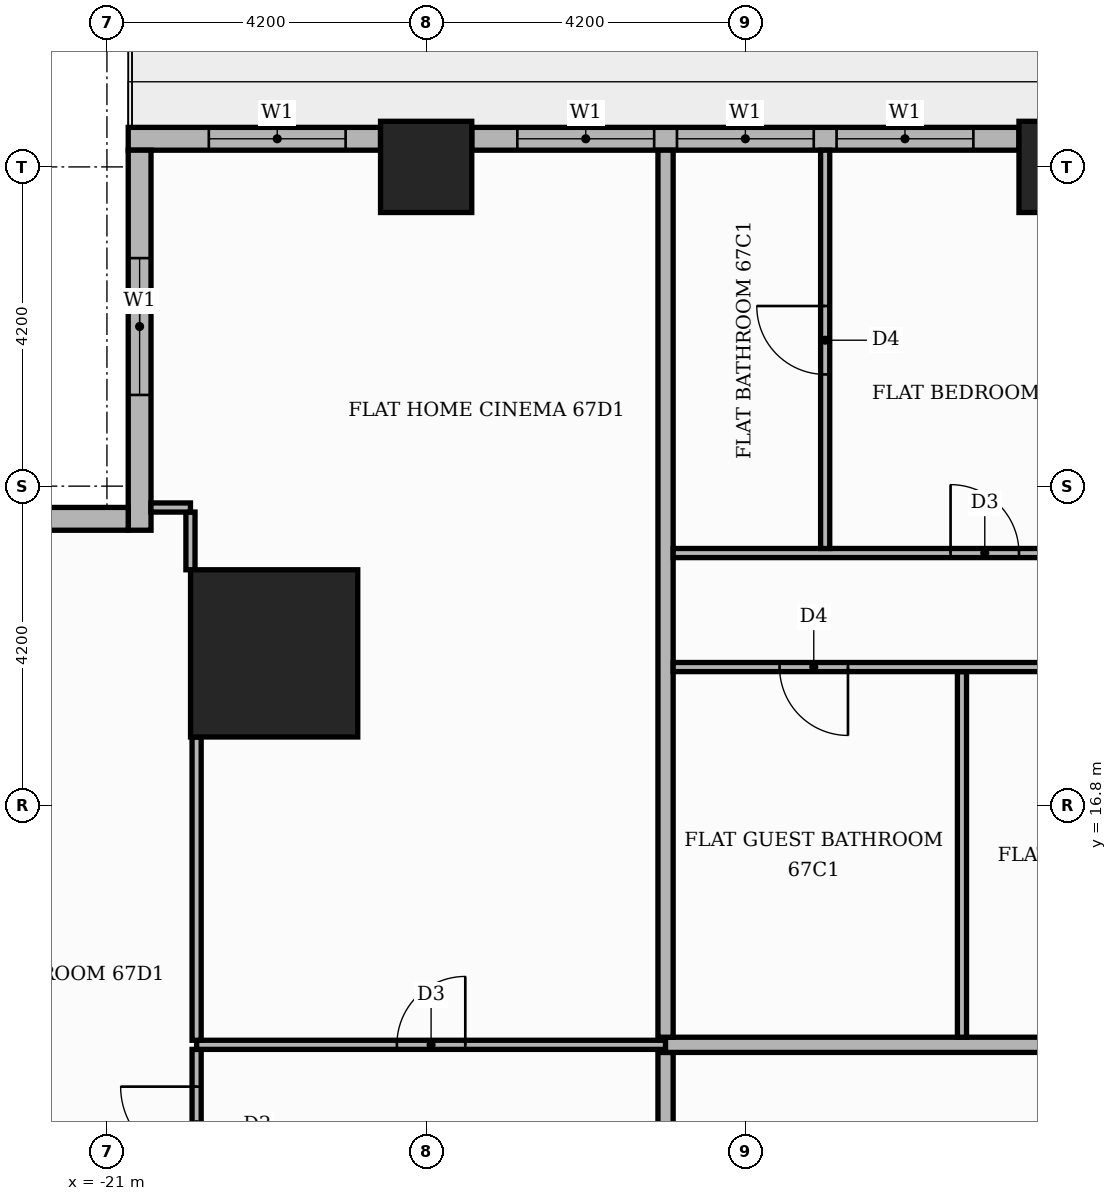
"""IFC4 building model, lengths in metres.
Left out: names, types, materials, properties, quantities, classifications, styles, units other than length and angle.
Written with IfcOpenShell. Run it as: python <this file> out.ifc"""

import sys

from ifc_helpers import new_model, si_unit, direction, frame, frame_2d, origin, origin_2d, place, context, subcontext, project, spatial, rectangle, extrude, element, fill, save


model = new_model("IFC4")
c1 = context("Model", 3, precision=1e-05, world=origin(), true_north=direction((0.0, 1.0)))
c2 = subcontext(c1, "Body", "Model", "MODEL_VIEW")
j1 = project(units=[si_unit("LENGTHUNIT", "METRE"), si_unit("PLANEANGLEUNIT", "RADIAN")], contexts=[c1])
p1 = place(None, origin())
s1 = spatial("IfcSite", under=j1, at=p1, CompositionType="ELEMENT")
p2 = place(p1, origin())
s2 = spatial("IfcBuilding", under=s1, at=p2, CompositionType="ELEMENT")
p3 = place(p2, frame((0.0, 0.0, 279.6)))
s3 = spatial("IfcBuildingStorey", under=s2, at=p3, CompositionType="ELEMENT", Elevation=279.6)
p4 = place(p3, frame((-18.8, 18.8, 0.0), z_axis=(0.0, 0.0, 1.0), x_axis=(1.0, 0.0, 0.0)))
e1 = element("IfcColumn", 1, at=p4, inside=s3, PredefinedType="COLUMN", context=c2, shape_type="SweptSolid", body=[
    extrude(rectangle(XDim=2.2, YDim=2.2, at=origin_2d()), origin(), (0.0, 0.0, 1.0), 3.9),
])
for number, where, z_axis, x_axis in (
    (2, (-8.4, 25.2, 0.0), (0.0, 0.0, 1.0), (1.0, 0.0, 0.0)),
    (3, (-16.8, 25.2, 0.0), (0.0, 0.0, 1.0), (1.0, 0.0, 0.0)),
):
    element("IfcColumn", number, at=place(p3, frame(where, z_axis=z_axis, x_axis=x_axis)), inside=s3, PredefinedType="COLUMN", context=c2, shape_type="SweptSolid", body=[
        extrude(rectangle(XDim=1.2, YDim=1.2, at=origin_2d()), origin(), (0.0, 0.0, 1.0), 3.9),
    ])
p5 = place(p3, frame((-9.0, 25.57, 0.0), z_axis=(0.0, 0.0, 1.0), x_axis=(-1.0, 0.0, 0.0)))
e4 = element("IfcWall", 4, at=p5, inside=s3, PredefinedType="STANDARD", context=c2, shape_type="SweptSolid", body=[
    extrude(rectangle(XDim=7.2, YDim=0.3, at=frame_2d((3.6, 0.0))), origin(), (0.0, 0.0, 1.0), 3.48),
])
p6 = place(p5, frame((0.6, 0.0, 0.9)))
e5 = element("IfcOpeningElement", 5, at=p6, cuts=e4, PredefinedType="OPENING", context=c2, shape_type="SweptSolid", body=[
    extrude(rectangle(XDim=1.8, YDim=2.1, at=frame_2d((0.9, 1.05))), frame((0.0, 0.16, 0.0), z_axis=(0.0, -1.0, 0.0), x_axis=(1.0, 0.0, 0.0)), (0.0, 0.0, 1.0), 0.32),
])
p7 = place(p5, frame((2.7, 0.0, 0.9)))
e6 = element("IfcOpeningElement", 6, at=p7, cuts=e4, PredefinedType="OPENING", context=c2, shape_type="SweptSolid", body=[
    extrude(rectangle(XDim=1.8, YDim=2.1, at=frame_2d((0.9, 1.05))), frame((0.0, 0.16, 0.0), z_axis=(0.0, -1.0, 0.0), x_axis=(1.0, 0.0, 0.0)), (0.0, 0.0, 1.0), 0.32),
])
p8 = place(p5, frame((4.8, 0.0, 0.9)))
e7 = element("IfcOpeningElement", 7, at=p8, cuts=e4, PredefinedType="OPENING", context=c2, shape_type="SweptSolid", body=[
    extrude(rectangle(XDim=1.8, YDim=2.1, at=frame_2d((0.9, 1.05))), frame((0.0, 0.16, 0.0), z_axis=(0.0, -1.0, 0.0), x_axis=(1.0, 0.0, 0.0)), (0.0, 0.0, 1.0), 0.32),
])
p9 = place(p3, frame((-17.4, 25.57, 0.0), z_axis=(0.0, 0.0, 1.0), x_axis=(-1.0, 0.0, 0.0)))
e8 = element("IfcWall", 8, at=p9, inside=s3, PredefinedType="STANDARD", context=c2, shape_type="SweptSolid", body=[
    extrude(rectangle(XDim=3.32, YDim=0.3, at=frame_2d((1.66, 0.0))), origin(), (0.0, 0.0, 1.0), 3.48),
])
p10 = place(p9, frame((0.459, 0.0, 0.9)))
e9 = element("IfcOpeningElement", 9, at=p10, cuts=e8, PredefinedType="OPENING", context=c2, shape_type="SweptSolid", body=[
    extrude(rectangle(XDim=1.8, YDim=2.1, at=frame_2d((0.9, 1.05))), frame((0.0, 0.16, 0.0), z_axis=(0.0, -1.0, 0.0), x_axis=(1.0, 0.0, 0.0)), (0.0, 0.0, 1.0), 0.32),
])
p11 = place(p3, frame((-20.57, 25.42, 0.0), z_axis=(0.0, 0.0, 1.0), x_axis=(0.0, -1.0, 0.0)))
e10 = element("IfcWall", 10, at=p11, inside=s3, PredefinedType="STANDARD", context=c2, shape_type="SweptSolid", body=[
    extrude(rectangle(XDim=5.0, YDim=0.3, at=frame_2d((2.5, 0.0))), origin(), (0.0, 0.0, 1.0), 3.48),
])
p12 = place(p11, frame((1.42, 0.0, 0.9)))
e11 = element("IfcOpeningElement", 11, at=p12, cuts=e10, PredefinedType="OPENING", context=c2, shape_type="SweptSolid", body=[
    extrude(rectangle(XDim=1.8, YDim=2.1, at=frame_2d((0.9, 1.05))), frame((0.0, 0.16, 0.0), z_axis=(0.0, -1.0, 0.0), x_axis=(1.0, 0.0, 0.0)), (0.0, 0.0, 1.0), 0.32),
])
p13 = place(p3, frame((-20.72, 20.57, 0.0), z_axis=(0.0, 0.0, 1.0), x_axis=(-1.0, 0.0, 0.0)))
e12 = element("IfcWall", 12, at=p13, inside=s3, PredefinedType="STANDARD", context=c2, shape_type="SweptSolid", body=[
    extrude(rectangle(XDim=5.0, YDim=0.3, at=frame_2d((2.5, 0.0))), origin(), (0.0, 0.0, 1.0), 3.48),
])
p14 = place(p13, frame((1.48, 0.0, 0.9)))
e13 = element("IfcOpeningElement", 13, at=p14, cuts=e12, PredefinedType="OPENING", context=c2, shape_type="SweptSolid", body=[
    extrude(rectangle(XDim=1.8, YDim=2.1, at=frame_2d((0.9, 1.05))), frame((0.0, 0.16, 0.0), z_axis=(0.0, -1.0, 0.0), x_axis=(1.0, 0.0, 0.0)), (0.0, 0.0, 1.0), 0.32),
])
p15 = place(p3, frame((-13.65, 11.1, 0.0), z_axis=(0.0, 0.0, 1.0), x_axis=(0.0, 1.0, 0.0)))
e14 = element("IfcWall", 14, at=p15, inside=s3, PredefinedType="PARTITIONING", context=c2, shape_type="SweptSolid", body=[
    extrude(rectangle(XDim=2.45, YDim=0.2, at=frame_2d((1.225, 0.0))), origin(), (0.0, 0.0, 1.0), 3.48),
])
p16 = place(p3, frame((-19.82, 11.61, 0.0), z_axis=(0.0, 0.0, 1.0), x_axis=(0.0, 1.0, 0.0)))
e15 = element("IfcWall", 15, at=p16, inside=s3, PredefinedType="PARTITIONING", context=c2, shape_type="SweptSolid", body=[
    extrude(rectangle(XDim=1.98, YDim=0.12, at=frame_2d((0.99, 0.0))), origin(), (0.0, 0.0, 1.0), 3.48),
])
p17 = place(p16, frame((0.49, 0.0, 0.0)))
e16 = element("IfcOpeningElement", 16, at=p17, cuts=e15, PredefinedType="OPENING", context=c2, shape_type="SweptSolid", body=[
    extrude(rectangle(XDim=1.0, YDim=2.1, at=frame_2d((0.5, 1.05))), frame((0.0, 0.07, 0.0), z_axis=(0.0, -1.0, 0.0), x_axis=(1.0, 0.0, 0.0)), (0.0, 0.0, 1.0), 0.14),
])
p18 = place(p3, frame((-19.82, 13.65, 0.0), z_axis=(0.0, 0.0, 1.0), x_axis=(1.0, 0.0, 0.0)))
e17 = element("IfcWall", 17, at=p18, inside=s3, PredefinedType="PARTITIONING", context=c2, shape_type="SweptSolid", body=[
    extrude(rectangle(XDim=6.17, YDim=0.12, at=frame_2d((3.085, 0.0))), origin(), (0.0, 0.0, 1.0), 3.48),
])
p19 = place(p18, frame((2.635, 0.0, 0.0)))
e18 = element("IfcOpeningElement", 18, at=p19, cuts=e17, PredefinedType="OPENING", context=c2, shape_type="SweptSolid", body=[
    extrude(rectangle(XDim=0.9, YDim=2.1, at=frame_2d((0.45, 1.05))), frame((0.0, 0.07, 0.0), z_axis=(0.0, -1.0, 0.0), x_axis=(1.0, 0.0, 0.0)), (0.0, 0.0, 1.0), 0.14),
])
p20 = place(p3, frame((-13.65, 13.65, 0.0), z_axis=(0.0, 0.0, 1.0), x_axis=(1.0, 0.0, 0.0)))
e19 = element("IfcWall", 19, at=p20, inside=s3, PredefinedType="PARTITIONING", context=c2, shape_type="SweptSolid", body=[
    extrude(rectangle(XDim=39.07, YDim=0.2, at=frame_2d((19.535, 0.0))), origin(), (0.0, 0.0, 1.0), 3.48),
])
p21 = place(p20, frame((23.6, 0.0, 0.0)))
e20 = element("IfcOpeningElement", 20, at=p21, cuts=e19, PredefinedType="OPENING", context=c2, shape_type="SweptSolid", body=[
    extrude(rectangle(XDim=1.1, YDim=2.4, at=frame_2d((0.55, 1.2))), frame((0.0, 0.11, 0.0), z_axis=(0.0, -1.0, 0.0), x_axis=(1.0, 0.0, 0.0)), (0.0, 0.0, 1.0), 0.22),
])
p22 = place(p3, frame((-19.82, 13.71, 0.0), z_axis=(0.0, 0.0, 1.0), x_axis=(0.0, 1.0, 0.0)))
e21 = element("IfcWall", 21, at=p22, inside=s3, PredefinedType="PARTITIONING", context=c2, shape_type="SweptSolid", body=[
    extrude(rectangle(XDim=3.99, YDim=0.12, at=frame_2d((1.995, 0.0))), origin(), (0.0, 0.0, 1.0), 3.48),
])
p23 = place(p3, frame((-13.65, 13.75, 0.0), z_axis=(0.0, 0.0, 1.0), x_axis=(0.0, 1.0, 0.0)))
e22 = element("IfcWall", 22, at=p23, inside=s3, PredefinedType="PARTITIONING", context=c2, shape_type="SweptSolid", body=[
    extrude(rectangle(XDim=11.67, YDim=0.2, at=frame_2d((5.835, 0.0))), origin(), (0.0, 0.0, 1.0), 3.48),
])
p24 = place(p3, frame((-9.75, 13.75, 0.0), z_axis=(0.0, 0.0, 1.0), x_axis=(0.0, 1.0, 0.0)))
e23 = element("IfcWall", 23, at=p24, inside=s3, PredefinedType="PARTITIONING", context=c2, shape_type="SweptSolid", body=[
    extrude(rectangle(XDim=4.81, YDim=0.12, at=frame_2d((2.405, 0.0))), origin(), (0.0, 0.0, 1.0), 3.48),
])
p25 = place(p3, frame((-13.55, 18.62, 0.0), z_axis=(0.0, 0.0, 1.0), x_axis=(1.0, 0.0, 0.0)))
e24 = element("IfcWall", 24, at=p25, inside=s3, PredefinedType="PARTITIONING", context=c2, shape_type="SweptSolid", body=[
    extrude(rectangle(XDim=20.9, YDim=0.12, at=frame_2d((10.45, 0.0))), origin(), (0.0, 0.0, 1.0), 3.48),
])
p26 = place(p25, frame((16.925, 0.0, 0.0)))
e25 = element("IfcOpeningElement", 25, at=p26, cuts=e24, PredefinedType="OPENING", context=c2, shape_type="SweptSolid", body=[
    extrude(rectangle(XDim=0.9, YDim=2.1, at=frame_2d((0.45, 1.05))), frame((0.0, 0.07, 0.0), z_axis=(0.0, -1.0, 0.0), x_axis=(1.0, 0.0, 0.0)), (0.0, 0.0, 1.0), 0.14),
])
p27 = place(p25, frame((11.675, 0.0, 0.0)))
e26 = element("IfcOpeningElement", 26, at=p27, cuts=e24, PredefinedType="OPENING", context=c2, shape_type="SweptSolid", body=[
    extrude(rectangle(XDim=0.9, YDim=2.1, at=frame_2d((0.45, 1.05))), frame((0.0, 0.07, 0.0), z_axis=(0.0, -1.0, 0.0), x_axis=(1.0, 0.0, 0.0)), (0.0, 0.0, 1.0), 0.14),
])
p28 = place(p25, frame((8.9, 0.0, 0.0)))
e27 = element("IfcOpeningElement", 27, at=p28, cuts=e24, PredefinedType="OPENING", context=c2, shape_type="SweptSolid", body=[
    extrude(rectangle(XDim=0.9, YDim=2.1, at=frame_2d((0.45, 1.05))), frame((0.0, 0.07, 0.0), z_axis=(0.0, -1.0, 0.0), x_axis=(1.0, 0.0, 0.0)), (0.0, 0.0, 1.0), 0.14),
])
p29 = place(p25, frame((5.6, 0.0, 0.0)))
e28 = element("IfcOpeningElement", 28, at=p29, cuts=e24, PredefinedType="OPENING", context=c2, shape_type="SweptSolid", body=[
    extrude(rectangle(XDim=0.9, YDim=2.1, at=frame_2d((0.45, 1.05))), frame((0.0, 0.07, 0.0), z_axis=(0.0, -1.0, 0.0), x_axis=(1.0, 0.0, 0.0)), (0.0, 0.0, 1.0), 0.14),
])
p30 = place(p25, frame((1.4, 0.0, 0.0)))
e29 = element("IfcOpeningElement", 29, at=p30, cuts=e24, PredefinedType="OPENING", context=c2, shape_type="SweptSolid", body=[
    extrude(rectangle(XDim=0.9, YDim=2.1, at=frame_2d((0.45, 1.05))), frame((0.0, 0.07, 0.0), z_axis=(0.0, -1.0, 0.0), x_axis=(1.0, 0.0, 0.0)), (0.0, 0.0, 1.0), 0.14),
])
p31 = place(p3, frame((-19.901, 19.9, 0.0), z_axis=(0.0, 0.0, 1.0), x_axis=(0.0, 1.0, 0.0)))
e30 = element("IfcWall", 30, at=p31, inside=s3, PredefinedType="PARTITIONING", context=c2, shape_type="SweptSolid", body=[
    extrude(rectangle(XDim=0.759, YDim=0.12, at=frame_2d((0.379, 0.0))), origin(), (0.0, 0.0, 1.0), 3.48),
])
p32 = place(p3, frame((-13.55, 20.12, 0.0), z_axis=(0.0, 0.0, 1.0), x_axis=(1.0, 0.0, 0.0)))
e31 = element("IfcWall", 31, at=p32, inside=s3, PredefinedType="PARTITIONING", context=c2, shape_type="SweptSolid", body=[
    extrude(rectangle(XDim=34.269, YDim=0.12, at=frame_2d((17.135, 0.0))), origin(), (0.0, 0.0, 1.0), 3.48),
])
p33 = place(p32, frame((25.65, 0.0, 0.0)))
e32 = element("IfcOpeningElement", 32, at=p33, cuts=e31, PredefinedType="OPENING", context=c2, shape_type="SweptSolid", body=[
    extrude(rectangle(XDim=1.0, YDim=2.1, at=frame_2d((0.5, 1.05))), frame((0.0, 0.07, 0.0), z_axis=(0.0, -1.0, 0.0), x_axis=(1.0, 0.0, 0.0)), (0.0, 0.0, 1.0), 0.14),
])
p34 = place(p32, frame((22.55, 0.0, 0.0)))
e33 = element("IfcOpeningElement", 33, at=p34, cuts=e31, PredefinedType="OPENING", context=c2, shape_type="SweptSolid", body=[
    extrude(rectangle(XDim=0.9, YDim=2.1, at=frame_2d((0.45, 1.05))), frame((0.0, 0.07, 0.0), z_axis=(0.0, -1.0, 0.0), x_axis=(1.0, 0.0, 0.0)), (0.0, 0.0, 1.0), 0.14),
])
p35 = place(p32, frame((18.35, 0.0, 0.0)))
e34 = element("IfcOpeningElement", 34, at=p35, cuts=e31, PredefinedType="OPENING", context=c2, shape_type="SweptSolid", body=[
    extrude(rectangle(XDim=0.9, YDim=2.1, at=frame_2d((0.45, 1.05))), frame((0.0, 0.07, 0.0), z_axis=(0.0, -1.0, 0.0), x_axis=(1.0, 0.0, 0.0)), (0.0, 0.0, 1.0), 0.14),
])
p36 = place(p32, frame((9.95, 0.0, 0.0)))
e35 = element("IfcOpeningElement", 35, at=p36, cuts=e31, PredefinedType="OPENING", context=c2, shape_type="SweptSolid", body=[
    extrude(rectangle(XDim=0.9, YDim=2.1, at=frame_2d((0.45, 1.05))), frame((0.0, 0.07, 0.0), z_axis=(0.0, -1.0, 0.0), x_axis=(1.0, 0.0, 0.0)), (0.0, 0.0, 1.0), 0.14),
])
p37 = place(p32, frame((3.65, 0.0, 0.0)))
e36 = element("IfcOpeningElement", 36, at=p37, cuts=e31, PredefinedType="OPENING", context=c2, shape_type="SweptSolid", body=[
    extrude(rectangle(XDim=0.9, YDim=2.1, at=frame_2d((0.45, 1.05))), frame((0.0, 0.07, 0.0), z_axis=(0.0, -1.0, 0.0), x_axis=(1.0, 0.0, 0.0)), (0.0, 0.0, 1.0), 0.14),
])
p38 = place(p3, frame((-11.55, 20.18, 0.0), z_axis=(0.0, 0.0, 1.0), x_axis=(0.0, 1.0, 0.0)))
e37 = element("IfcWall", 37, at=p38, inside=s3, PredefinedType="PARTITIONING", context=c2, shape_type="SweptSolid", body=[
    extrude(rectangle(XDim=5.24, YDim=0.12, at=frame_2d((2.62, 0.0))), origin(), (0.0, 0.0, 1.0), 3.48),
])
p39 = place(p38, frame((2.29, 0.0, 0.0)))
e38 = element("IfcOpeningElement", 38, at=p39, cuts=e37, PredefinedType="OPENING", context=c2, shape_type="SweptSolid", body=[
    extrude(rectangle(XDim=0.9, YDim=2.1, at=frame_2d((0.45, 1.05))), frame((0.0, 0.07, 0.0), z_axis=(0.0, -1.0, 0.0), x_axis=(1.0, 0.0, 0.0)), (0.0, 0.0, 1.0), 0.14),
])
p40 = place(p3, frame((-20.421, 20.719, 0.0), z_axis=(0.0, 0.0, 1.0), x_axis=(1.0, 0.0, 0.0)))
e39 = element("IfcWall", 39, at=p40, inside=s3, PredefinedType="PARTITIONING", context=c2, shape_type="SweptSolid", body=[
    extrude(rectangle(XDim=0.52, YDim=0.12, at=frame_2d((0.26, 0.0))), origin(), (0.0, 0.0, 1.0), 3.48),
])
p41 = place(p6, origin())
e40 = element("IfcWindow", 40, at=p41, inside=s3, PartitioningType="SINGLE_PANEL", PredefinedType="WINDOW", context=c2, shape_type="SweptSolid", body=[
    extrude(rectangle(XDim=1.8, YDim=2.1, at=frame_2d((0.9, 1.05))), frame((0.0, 0.03, 0.0), z_axis=(0.0, -1.0, 0.0), x_axis=(1.0, 0.0, 0.0)), (0.0, 0.0, 1.0), 0.06),
])
fill(e5, e40)
p42 = place(p7, origin())
e41 = element("IfcWindow", 41, at=p42, inside=s3, PartitioningType="SINGLE_PANEL", PredefinedType="WINDOW", context=c2, shape_type="SweptSolid", body=[
    extrude(rectangle(XDim=1.8, YDim=2.1, at=frame_2d((0.9, 1.05))), frame((0.0, 0.03, 0.0), z_axis=(0.0, -1.0, 0.0), x_axis=(1.0, 0.0, 0.0)), (0.0, 0.0, 1.0), 0.06),
])
fill(e6, e41)
p43 = place(p8, origin())
e42 = element("IfcWindow", 42, at=p43, inside=s3, PartitioningType="SINGLE_PANEL", PredefinedType="WINDOW", context=c2, shape_type="SweptSolid", body=[
    extrude(rectangle(XDim=1.8, YDim=2.1, at=frame_2d((0.9, 1.05))), frame((0.0, 0.03, 0.0), z_axis=(0.0, -1.0, 0.0), x_axis=(1.0, 0.0, 0.0)), (0.0, 0.0, 1.0), 0.06),
])
fill(e7, e42)
p44 = place(p10, origin())
e43 = element("IfcWindow", 43, at=p44, inside=s3, PartitioningType="SINGLE_PANEL", PredefinedType="WINDOW", context=c2, shape_type="SweptSolid", body=[
    extrude(rectangle(XDim=1.8, YDim=2.1, at=frame_2d((0.9, 1.05))), frame((0.0, 0.03, 0.0), z_axis=(0.0, -1.0, 0.0), x_axis=(1.0, 0.0, 0.0)), (0.0, 0.0, 1.0), 0.06),
])
fill(e9, e43)
p45 = place(p12, origin())
e44 = element("IfcWindow", 44, at=p45, inside=s3, PartitioningType="SINGLE_PANEL", PredefinedType="WINDOW", context=c2, shape_type="SweptSolid", body=[
    extrude(rectangle(XDim=1.8, YDim=2.1, at=frame_2d((0.9, 1.05))), frame((0.0, 0.03, 0.0), z_axis=(0.0, -1.0, 0.0), x_axis=(1.0, 0.0, 0.0)), (0.0, 0.0, 1.0), 0.06),
])
fill(e11, e44)
p46 = place(p30, frame((0.9, 0.0, 0.0), z_axis=(0.0, 0.0, 1.0), x_axis=(-1.0, 0.0, 0.0)))
e45 = element("IfcDoor", 45, at=p46, inside=s3, OperationType="SINGLE_SWING_RIGHT", PredefinedType="DOOR", context=c2, shape_type="SweptSolid", body=[
    extrude(rectangle(XDim=0.9, YDim=2.1, at=frame_2d((0.45, 1.05))), frame((0.0, 0.025, 0.0), z_axis=(0.0, -1.0, 0.0), x_axis=(1.0, 0.0, 0.0)), (0.0, 0.0, 1.0), 0.05),
])
fill(e29, e45)
p47 = place(p37, origin())
e46 = element("IfcDoor", 46, at=p47, inside=s3, OperationType="SINGLE_SWING_LEFT", PredefinedType="DOOR", context=c2, shape_type="SweptSolid", body=[
    extrude(rectangle(XDim=0.9, YDim=2.1, at=frame_2d((0.45, 1.05))), frame((0.0, 0.025, 0.0), z_axis=(0.0, -1.0, 0.0), x_axis=(1.0, 0.0, 0.0)), (0.0, 0.0, 1.0), 0.05),
])
fill(e36, e46)
p48 = place(p39, origin())
e47 = element("IfcDoor", 47, at=p48, inside=s3, OperationType="SINGLE_SWING_RIGHT", PredefinedType="DOOR", context=c2, shape_type="SweptSolid", body=[
    extrude(rectangle(XDim=0.9, YDim=2.1, at=frame_2d((0.45, 1.05))), frame((0.0, 0.025, 0.0), z_axis=(0.0, -1.0, 0.0), x_axis=(1.0, 0.0, 0.0)), (0.0, 0.0, 1.0), 0.05),
])
fill(e38, e47)
p49 = place(p19, origin())
e48 = element("IfcDoor", 48, at=p49, inside=s3, OperationType="SINGLE_SWING_RIGHT", PredefinedType="DOOR", context=c2, shape_type="SweptSolid", body=[
    extrude(rectangle(XDim=0.9, YDim=2.1, at=frame_2d((0.45, 1.05))), frame((0.0, 0.025, 0.0), z_axis=(0.0, -1.0, 0.0), x_axis=(1.0, 0.0, 0.0)), (0.0, 0.0, 1.0), 0.05),
])
fill(e18, e48)
p50 = place(p17, origin())
e49 = element("IfcDoor", 49, at=p50, inside=s3, OperationType="SINGLE_SWING_RIGHT", PredefinedType="DOOR", context=c2, shape_type="SweptSolid", body=[
    extrude(rectangle(XDim=1.0, YDim=2.1, at=frame_2d((0.5, 1.05))), frame((0.0, 0.025, 0.0), z_axis=(0.0, -1.0, 0.0), x_axis=(1.0, 0.0, 0.0)), (0.0, 0.0, 1.0), 0.05),
])
fill(e16, e49)
save(model, sys.argv[1])
